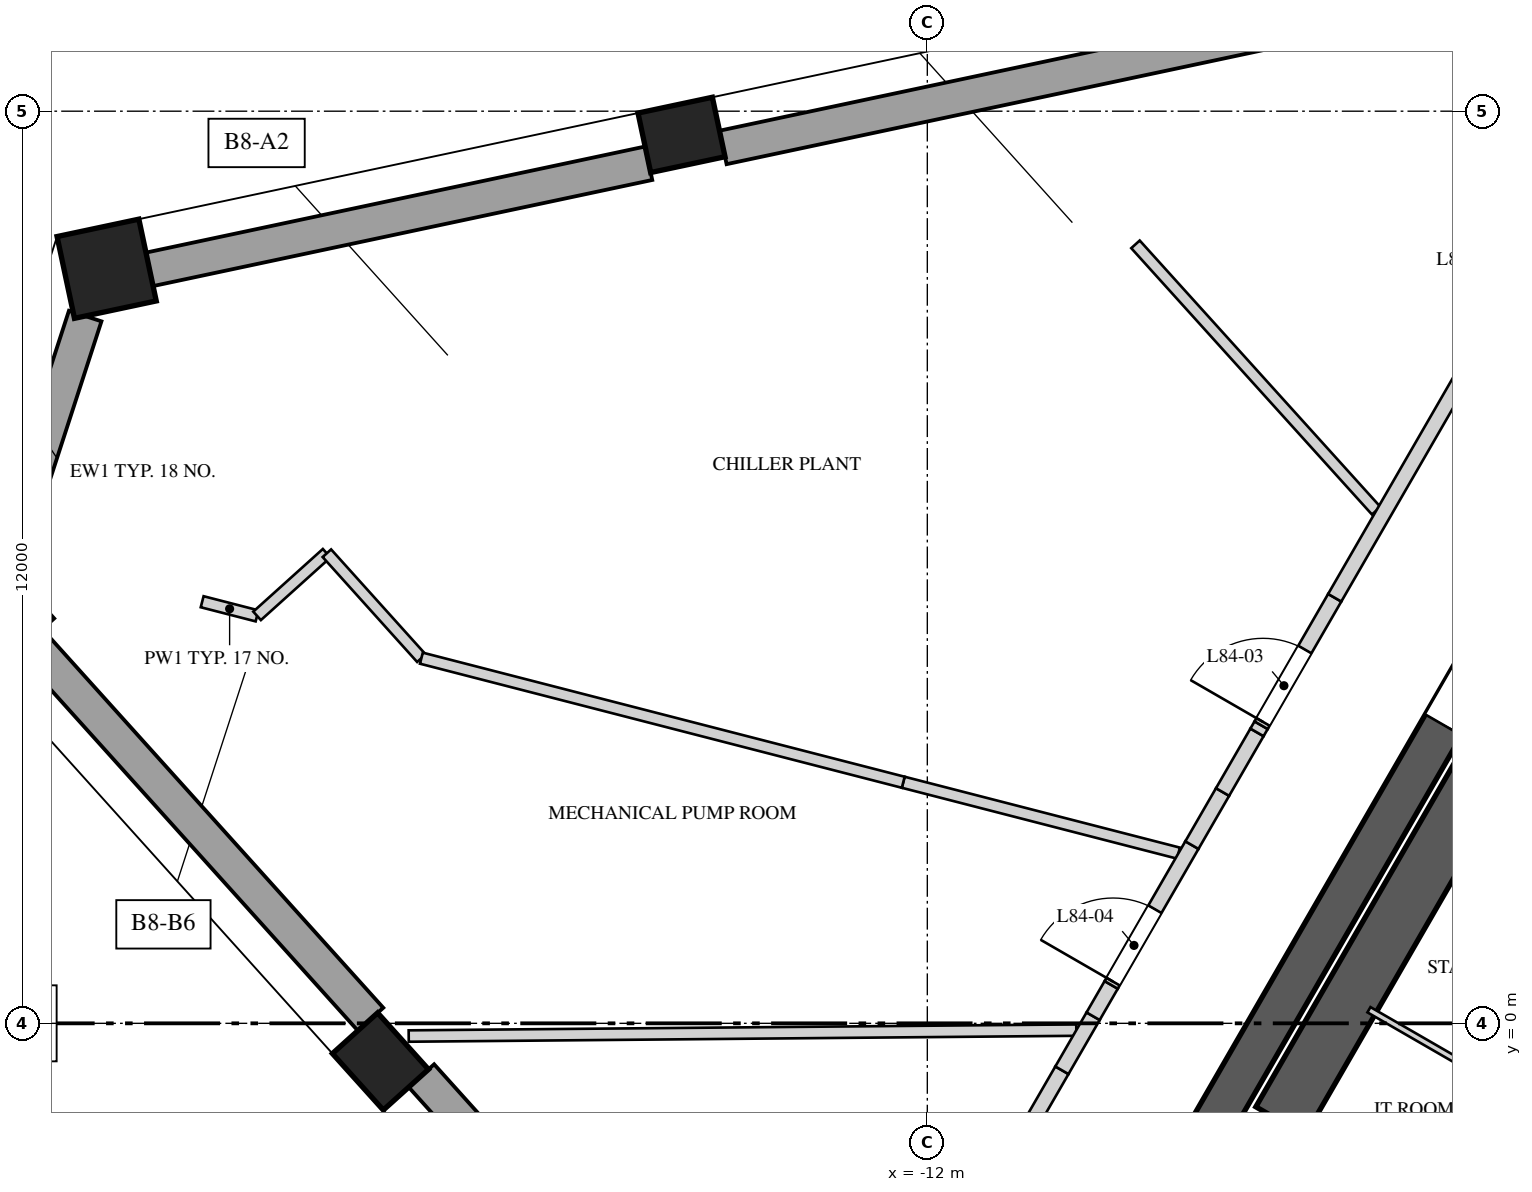
"""IFC4 building model, lengths in metres.
Left out: names, types, materials, properties, quantities, classifications, styles, units other than length and angle.
Written with IfcOpenShell. Run it as: python <this file> out.ifc"""

import sys

from ifc_helpers import new_model, si_unit, direction, frame, frame_2d, origin, origin_2d, place, context, subcontext, project, spatial, polyline, rectangle, outline, extrude, element, fill, save


model = new_model("IFC4")
c1 = context("Model", 3, precision=1e-05, world=origin(), true_north=direction((0.0, 1.0)))
c2 = subcontext(c1, "Body", "Model", "MODEL_VIEW")
j1 = project(units=[si_unit("LENGTHUNIT", "METRE"), si_unit("PLANEANGLEUNIT", "RADIAN")], contexts=[c1])
p1 = place(None, origin())
s1 = spatial("IfcSite", under=j1, at=p1, CompositionType="ELEMENT")
p2 = place(p1, origin())
s2 = spatial("IfcBuilding", under=s1, at=p2, CompositionType="ELEMENT")
p3 = place(p2, frame((0.0, 0.0, 365.9)))
s3 = spatial("IfcBuildingStorey", under=s2, at=p3, CompositionType="ELEMENT", Elevation=365.9)
p4 = place(p3, frame((-1.285, 10.725, 0.0), z_axis=(0.0, 0.0, 1.0), x_axis=(-0.499994590896, -0.86602852671, 0.0)))
e1 = element("IfcWall", 1, at=p4, inside=s3, PredefinedType="SHEAR", context=c2, shape_type="SweptSolid", body=[
    extrude(rectangle(XDim=17.292, YDim=0.55, at=frame_2d((8.646, 0.0))), origin(), (0.0, 0.0, 1.0), 4.5),
])
p5 = place(p4, frame((6.851, 0.0, 0.0)))
e2 = element("IfcOpeningElement", 2, at=p5, cuts=e1, PredefinedType="OPENING", context=c2, shape_type="SweptSolid", body=[
    extrude(rectangle(XDim=1.0, YDim=2.4, at=frame_2d((0.5, 1.2))), frame((0.0, 0.285, 0.0), z_axis=(0.0, -1.0, 0.0), x_axis=(1.0, 0.0, 0.0)), (0.0, 0.0, 1.0), 0.57),
])
p6 = place(p3, frame((-24.278, 5.368, 0.0), z_axis=(0.0, 0.0, 1.0), x_axis=(0.669130606359, -0.743144825477, 0.0)))
e3 = element("IfcColumn", 3, at=p6, inside=s3, PredefinedType="COLUMN", context=c2, shape_type="SweptSolid", body=[
    extrude(rectangle(XDim=1.1, YDim=1.1, at=origin_2d()), origin(), (0.0, 0.0, 1.0), 4.5),
])
for number, where, z_axis, x_axis in (
    (4, (-19.195, -0.502, 0.0), (0.0, 0.0, 1.0), (0.669, -0.743, 0.0)),
    (5, (-15.234, 11.688, 0.0), (0.0, 0.0, 1.0), (-0.978, -0.208, 0.0)),
):
    element("IfcColumn", number, at=place(p3, frame(where, z_axis=z_axis, x_axis=x_axis)), inside=s3, PredefinedType="COLUMN", context=c2, shape_type="SweptSolid", body=[
        extrude(rectangle(XDim=1.0, YDim=0.8, at=origin_2d()), origin(), (0.0, 0.0, 1.0), 4.5),
    ])
p7 = place(p3, frame((-22.797, 9.927, 0.0), z_axis=(0.0, 0.0, 1.0), x_axis=(-0.978147600734, -0.207911690818, 0.0)))
e6 = element("IfcColumn", 6, at=p7, inside=s3, PredefinedType="COLUMN", context=c2, shape_type="SweptSolid", body=[
    extrude(rectangle(XDim=1.1, YDim=1.1, at=origin_2d()), origin(), (0.0, 0.0, 1.0), 4.5),
])
p8 = place(p3, frame((-23.079, 9.305, 0.0), z_axis=(0.0, 0.0, 1.0), x_axis=(-0.309076430482, -0.95103720228, 0.0)))
e7 = element("IfcWall", 7, at=p8, inside=s3, PredefinedType="SOLIDWALL", context=c2, shape_type="SweptSolid", body=[
    extrude(rectangle(XDim=3.435, YDim=0.45, at=frame_2d((1.718, 0.0))), origin(), (0.0, 0.0, 1.0), 3.8),
])
p9 = place(p3, frame((-23.817, 5.043, 0.0), z_axis=(0.0, 0.0, 1.0), x_axis=(0.669137493687, -0.743138624041, 0.0)))
e8 = element("IfcWall", 8, at=p9, inside=s3, PredefinedType="SOLIDWALL", context=c2, shape_type="SweptSolid", body=[
    extrude(rectangle(XDim=6.714, YDim=0.45, at=frame_2d((3.357, 0.0))), origin(), (0.0, 0.0, 1.0), 3.8),
])
p10 = place(p3, frame((-18.656, -0.689, 0.0), z_axis=(0.0, 0.0, 1.0), x_axis=(0.669117789535, -0.743156365598, 0.0)))
e9 = element("IfcWall", 9, at=p10, inside=s3, PredefinedType="SOLIDWALL", context=c2, shape_type="SweptSolid", body=[
    extrude(rectangle(XDim=7.314, YDim=0.45, at=frame_2d((3.657, 0.0))), origin(), (0.0, 0.0, 1.0), 3.8),
])
p11 = place(p3, frame((-15.666, 11.315, 0.0), z_axis=(0.0, 0.0, 1.0), x_axis=(-0.978144338977, -0.207927035587, 0.0)))
e10 = element("IfcWall", 10, at=p11, inside=s3, PredefinedType="SOLIDWALL", context=c2, shape_type="SweptSolid", body=[
    extrude(rectangle(XDim=6.714, YDim=0.45, at=frame_2d((3.357, 0.0))), origin(), (0.0, 0.0, 1.0), 3.8),
])
p12 = place(p3, frame((-7.533, 13.044, 0.0), z_axis=(0.0, 0.0, 1.0), x_axis=(-0.978151299843, -0.207894287118, 0.0)))
e11 = element("IfcWall", 11, at=p12, inside=s3, PredefinedType="SOLIDWALL", context=c2, shape_type="SweptSolid", body=[
    extrude(rectangle(XDim=7.314, YDim=0.45, at=frame_2d((3.657, 0.0))), origin(), (0.0, 0.0, 1.0), 3.8),
])
p13 = place(p3, frame((-4.603, 3.477, 0.0), z_axis=(0.0, 0.0, 1.0), x_axis=(-0.500015767406, -0.866016300277, 0.0)))
e12 = element("IfcWall", 12, at=p13, inside=s3, PredefinedType="SOLIDWALL", context=c2, shape_type="SweptSolid", body=[
    extrude(rectangle(XDim=5.5, YDim=0.75, at=frame_2d((2.75, 0.0))), origin(), (0.0, 0.0, 1.0), 4.15),
])
p14 = place(p3, frame((-4.155, -0.996, 0.0), z_axis=(0.0, 0.0, 1.0), x_axis=(-0.866016039709, 0.500016218704, 0.0)))
e13 = element("IfcWall", 13, at=p14, inside=s3, PredefinedType="PARTITIONING", context=c2, shape_type="SweptSolid", body=[
    extrude(rectangle(XDim=2.35, YDim=0.08, at=frame_2d((1.175, 0.0))), origin(), (0.0, 0.0, 1.0), 4.15),
])
p15 = place(p3, frame((-20.818, 5.361, 0.0), z_axis=(0.0, 0.0, 1.0), x_axis=(-0.968404914067, 0.24938308365, 0.0)))
e14 = element("IfcWall", 14, at=p15, inside=s3, PredefinedType="PARTITIONING", context=c2, shape_type="SweptSolid", body=[
    extrude(rectangle(XDim=0.746, YDim=0.15, at=frame_2d((0.373, 0.0))), origin(), (0.0, 0.0, 1.0), 4.15),
])
p16 = place(p3, frame((-19.902, 6.185, 0.0), z_axis=(0.0, 0.0, 1.0), x_axis=(-0.74319559291, -0.669074219111, 0.0)))
e15 = element("IfcWall", 15, at=p16, inside=s3, PredefinedType="PARTITIONING", context=c2, shape_type="SweptSolid", body=[
    extrude(rectangle(XDim=1.232, YDim=0.15, at=frame_2d((0.616, 0.0))), origin(), (0.0, 0.0, 1.0), 4.15),
])
p17 = place(p3, frame((-18.656, 4.804, 0.0), z_axis=(0.0, 0.0, 1.0), x_axis=(-0.669080876775, 0.743189599183, 0.0)))
e16 = element("IfcWall", 16, at=p17, inside=s3, PredefinedType="PARTITIONING", context=c2, shape_type="SweptSolid", body=[
    extrude(rectangle(XDim=1.858, YDim=0.15, at=frame_2d((0.929, 0.0))), origin(), (0.0, 0.0, 1.0), 4.15),
])
p18 = place(p3, frame((-10.04, -0.089, 0.0), z_axis=(0.0, 0.0, 1.0), x_axis=(-0.999960441248, -0.00889471414, 0.0)))
e17 = element("IfcWall", 17, at=p18, inside=s3, PredefinedType="PARTITIONING", context=c2, shape_type="SweptSolid", body=[
    extrude(rectangle(XDim=8.783, YDim=0.15, at=frame_2d((4.392, 0.0))), origin(), (0.0, 0.0, 1.0), 3.45),
])
p19 = place(p3, frame((-8.696, 2.239, 0.0), z_axis=(0.0, 0.0, 1.0), x_axis=(-0.968413242645, 0.249350739864, 0.0)))
e18 = element("IfcWall", 18, at=p19, inside=s3, PredefinedType="PARTITIONING", context=c2, shape_type="SweptSolid", body=[
    extrude(rectangle(XDim=3.739, YDim=0.15, at=frame_2d((1.87, 0.0))), origin(), (0.0, 0.0, 1.0), 3.05),
])
p20 = place(p3, frame((-12.317, 3.171, 0.0), z_axis=(0.0, 0.0, 1.0), x_axis=(-0.968404977987, 0.249382835437, 0.0)))
e19 = element("IfcWall", 19, at=p20, inside=s3, PredefinedType="PARTITIONING", context=c2, shape_type="SweptSolid", body=[
    extrude(rectangle(XDim=6.546, YDim=0.15, at=frame_2d((3.273, 0.0))), origin(), (0.0, 0.0, 1.0), 4.15),
])
p21 = place(p3, frame((-6.094, 6.744, 0.0), z_axis=(0.0, 0.0, 1.0), x_axis=(-0.670485503808, 0.741922630187, 0.0)))
e20 = element("IfcWall", 20, at=p21, inside=s3, PredefinedType="PARTITIONING", context=c2, shape_type="SweptSolid", body=[
    extrude(rectangle(XDim=4.723, YDim=0.15, at=frame_2d((2.362, 0.0))), origin(), (0.0, 0.0, 1.0), 4.15),
])
p22 = place(p3, frame((-12.326, -4.25, 0.0), z_axis=(0.0, 0.0, 1.0), x_axis=(0.499982771656, 0.866035350345, 0.0)))
e21 = element("IfcWall", 21, at=p22, inside=s3, PredefinedType="SOLIDWALL", context=c2, shape_type="SweptSolid", body=[
    extrude(rectangle(XDim=4.195, YDim=0.2, at=frame_2d((2.097, 0.0))), origin(), (0.0, 0.0, 1.0), 4.15),
])
p23 = place(p3, frame((-10.229, -0.617, 0.0), z_axis=(0.0, 0.0, 1.0), x_axis=(0.5001686003, 0.865928040471, 0.0)))
e22 = element("IfcWall", 22, at=p23, inside=s3, PredefinedType="SOLIDWALL", context=c2, shape_type="SweptSolid", body=[
    extrude(rectangle(XDim=0.821, YDim=0.2, at=frame_2d((0.411, 0.0))), origin(), (0.0, 0.0, 1.0), 3.45),
])
p24 = place(p3, frame((-9.819, 0.094, 0.0), z_axis=(0.0, 0.0, 1.0), x_axis=(0.500003887042, 0.866023159588, 0.0)))
e23 = element("IfcWall", 23, at=p24, inside=s3, PredefinedType="SOLIDWALL", context=c2, shape_type="SweptSolid", body=[
    extrude(rectangle(XDim=0.476, YDim=0.2, at=frame_2d((0.238, 0.0))), origin(), (0.0, 0.0, 1.0), 4.15),
])
p25 = place(p3, frame((-9.581, 0.505, 0.0), z_axis=(0.0, 0.0, 1.0), x_axis=(0.499984515995, 0.866034343295, 0.0)))
e24 = element("IfcWall", 24, at=p25, inside=s3, PredefinedType="SOLIDWALL", context=c2, shape_type="SweptSolid", body=[
    extrude(outline(polyline([(0.0, 0.0), (2.124, 0.0), (2.124, 3.05), (1.18, 3.05), (1.18, 4.15), (0.0, 4.15), (0.0, 0.0)])), frame((0.0, 0.1, 0.0), z_axis=(0.0, -1.0, 0.0), x_axis=(1.0, 0.0, 0.0)), (0.0, 0.0, 1.0), 0.2),
])
p26 = place(p25, frame((0.05, 0.0, 0.0)))
e25 = element("IfcOpeningElement", 25, at=p26, cuts=e24, PredefinedType="OPENING", context=c2, shape_type="SweptSolid", body=[
    extrude(rectangle(XDim=1.1, YDim=2.4, at=frame_2d((0.55, 1.2))), frame((0.0, 0.11, 0.0), z_axis=(0.0, -1.0, 0.0), x_axis=(1.0, 0.0, 0.0)), (0.0, 0.0, 1.0), 0.22),
])
p27 = place(p3, frame((-8.519, 2.344, 0.0), z_axis=(0.0, 0.0, 1.0), x_axis=(0.499914554297, 0.866074730264, 0.0)))
e26 = element("IfcWall", 26, at=p27, inside=s3, PredefinedType="SOLIDWALL", context=c2, shape_type="SweptSolid", body=[
    extrude(rectangle(XDim=0.807, YDim=0.2, at=frame_2d((0.403, 0.0))), origin(), (0.0, 0.0, 1.0), 4.15),
])
p28 = place(p3, frame((-8.116, 3.043, 0.0), z_axis=(0.0, 0.0, 1.0), x_axis=(0.499994660107, 0.866028486751, 0.0)))
e27 = element("IfcWall", 27, at=p28, inside=s3, PredefinedType="SOLIDWALL", context=c2, shape_type="SweptSolid", body=[
    extrude(rectangle(XDim=0.906, YDim=0.2, at=frame_2d((0.453, 0.0))), origin(), (0.0, 0.0, 1.0), 3.05),
])
p29 = place(p3, frame((-7.663, 3.828, 0.0), z_axis=(0.0, 0.0, 1.0), x_axis=(0.500240224089, 0.865886665912, 0.0)))
e28 = element("IfcWall", 28, at=p29, inside=s3, PredefinedType="SOLIDWALL", context=c2, shape_type="SweptSolid", body=[
    extrude(rectangle(XDim=0.109, YDim=0.2, at=frame_2d((0.054, 0.0))), origin(), (0.0, 0.0, 1.0), 4.15),
])
p30 = place(p3, frame((-7.608, 3.922, 0.0), z_axis=(0.0, 0.0, 1.0), x_axis=(0.500017114798, 0.866015522326, 0.0)))
e29 = element("IfcWall", 29, at=p30, inside=s3, PredefinedType="SOLIDWALL", context=c2, shape_type="SweptSolid", body=[
    extrude(outline(polyline([(0.0, 0.0), (1.937, 0.0), (1.936, 3.25), (1.129, 3.25), (1.129, 4.15), (0.0, 4.15), (0.0, 0.0)])), frame((0.0, 0.1, 0.0), z_axis=(0.0, -1.0, 0.0), x_axis=(1.0, 0.0, 0.0)), (0.0, 0.0, 1.0), 0.2),
])
p31 = place(p30, frame((0.05, 0.0, 0.0)))
e30 = element("IfcOpeningElement", 30, at=p31, cuts=e29, PredefinedType="OPENING", context=c2, shape_type="SweptSolid", body=[
    extrude(rectangle(XDim=1.1, YDim=2.4, at=frame_2d((0.55, 1.2))), frame((0.0, 0.11, 0.0), z_axis=(0.0, -1.0, 0.0), x_axis=(1.0, 0.0, 0.0)), (0.0, 0.0, 1.0), 0.22),
])
p32 = place(p3, frame((-6.64, 5.599, 0.0), z_axis=(0.0, 0.0, 1.0), x_axis=(0.499989998285, 0.8660311782, 0.0)))
e31 = element("IfcWall", 31, at=p32, inside=s3, PredefinedType="SOLIDWALL", context=c2, shape_type="SweptSolid", body=[
    extrude(rectangle(XDim=3.423, YDim=0.2, at=frame_2d((1.711, 0.0))), origin(), (0.0, 0.0, 1.0), 4.15),
])
p33 = place(p5, origin())
e32 = element("IfcDoor", 32, at=p33, inside=s3, OperationType="SINGLE_SWING_RIGHT", PredefinedType="DOOR", context=c2, shape_type="SweptSolid", body=[
    extrude(rectangle(XDim=1.0, YDim=2.4, at=frame_2d((0.5, 1.2))), frame((0.0, 0.025, 0.0), z_axis=(0.0, -1.0, 0.0), x_axis=(1.0, 0.0, 0.0)), (0.0, 0.0, 1.0), 0.05),
])
fill(e2, e32)
p34 = place(p31, origin())
e33 = element("IfcDoor", 33, at=p34, inside=s3, OperationType="SINGLE_SWING_LEFT", PredefinedType="DOOR", context=c2, shape_type="SweptSolid", body=[
    extrude(rectangle(XDim=1.1, YDim=2.4, at=frame_2d((0.55, 1.2))), frame((0.0, 0.025, 0.0), z_axis=(0.0, -1.0, 0.0), x_axis=(1.0, 0.0, 0.0)), (0.0, 0.0, 1.0), 0.05),
])
fill(e30, e33)
p35 = place(p26, origin())
e34 = element("IfcDoor", 34, at=p35, inside=s3, OperationType="SINGLE_SWING_RIGHT", PredefinedType="DOOR", context=c2, shape_type="SweptSolid", body=[
    extrude(rectangle(XDim=1.1, YDim=2.4, at=frame_2d((0.55, 1.2))), frame((0.0, 0.025, 0.0), z_axis=(0.0, -1.0, 0.0), x_axis=(1.0, 0.0, 0.0)), (0.0, 0.0, 1.0), 0.05),
])
fill(e25, e34)
save(model, sys.argv[1])
